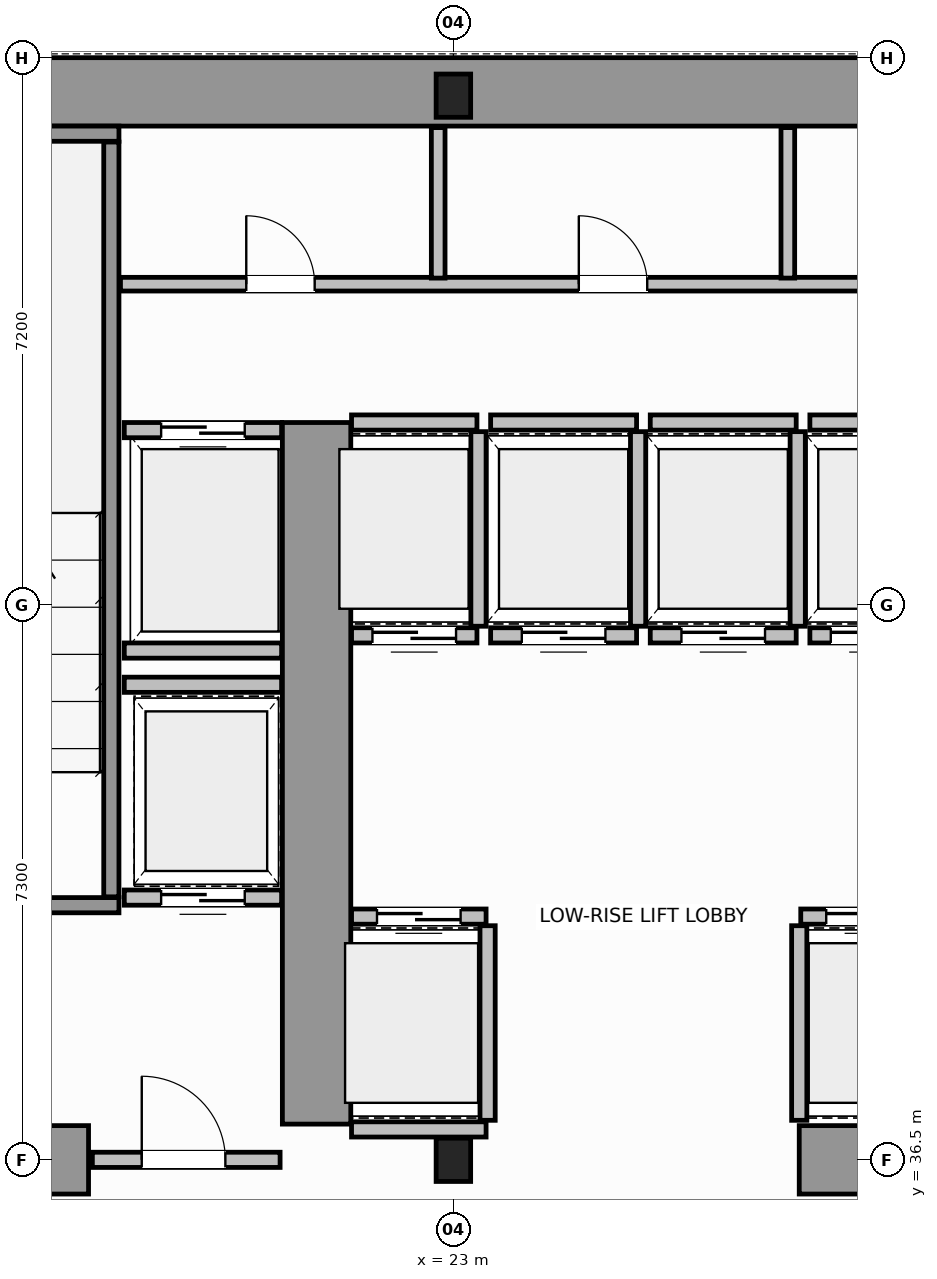
"""IFC4 building model, lengths in metres.
Left out: names, types, materials, properties, quantities, classifications, styles, units other than length and angle.
Written with IfcOpenShell. Run it as: python <this file> out.ifc"""

import sys

from ifc_helpers import new_model, si_unit, direction, frame, frame_2d, origin, origin_2d, place, context, subcontext, project, spatial, rectangle, i_section, extrude, source, transform, mapped, element, fill, save


model = new_model("IFC4")
c1 = context("Model", 3, precision=1e-05, world=origin(), true_north=direction((0.0, 1.0)))
c2 = subcontext(c1, "Body", "Model", "MODEL_VIEW")
j1 = project(units=[si_unit("LENGTHUNIT", "METRE"), si_unit("PLANEANGLEUNIT", "RADIAN")], contexts=[c1])
p1 = place(None, origin())
s1 = spatial("IfcSite", under=j1, at=p1, CompositionType="ELEMENT")
p2 = place(p1, origin())
s2 = spatial("IfcBuilding", under=s1, at=p2, CompositionType="ELEMENT")
p3 = place(p2, frame((0.0, 0.0, 18.8)))
s3 = spatial("IfcBuildingStorey", under=s2, at=p3, CompositionType="ELEMENT", Elevation=18.8)
m1 = source(origin(), c2, "Body", "SweptSolid", [
    extrude(i_section(OverallWidth=0.454, OverallDepth=0.569, WebThickness=0.078, FlangeThickness=0.08, FilletRadius=0.015, at=origin_2d()), origin(), (0.0, 0.0, 1.0), 3.8),
])
for number, where, z_axis, x_axis in (
    (1, (23.0, 36.5, 0.0), (0.0, 0.0, 1.0), (1.0, 0.0, 0.0)),
    (2, (23.0, 50.5, 0.0), (0.0, 0.0, 1.0), (1.0, 0.0, 0.0)),
):
    element("IfcColumn", number, at=place(p3, frame(where, z_axis=z_axis, x_axis=x_axis)), inside=s3, PredefinedType="COLUMN", context=c2, shape_type="MappedRepresentation", body=[
        mapped(m1, transform((0.0, 0.0, 0.0), scale=1.0)),
    ])
p4 = place(p3, frame((14.454, 50.55, 0.0), z_axis=(0.0, 0.0, 1.0), x_axis=(1.0, 0.0, 0.0)))
e3 = element("IfcWall", 3, at=p4, inside=s3, PredefinedType="SHEAR", context=c2, shape_type="SweptSolid", body=[
    extrude(rectangle(XDim=19.544, YDim=0.9, at=frame_2d((9.772, 0.0))), origin(), (0.0, 0.0, 1.0), 3.8),
])
p5 = place(p3, frame((14.47, 36.5, 0.0), z_axis=(0.0, 0.0, 1.0), x_axis=(1.0, 0.0, 0.0)))
e4 = element("IfcWall", 4, at=p5, inside=s3, PredefinedType="SHEAR", context=c2, shape_type="SweptSolid", body=[
    extrude(rectangle(XDim=3.73, YDim=0.9, at=frame_2d((1.865, 0.0))), origin(), (0.0, 0.0, 1.0), 2.38),
])
p6 = place(p3, frame((27.55, 36.5, 0.0), z_axis=(0.0, 0.0, 1.0), x_axis=(1.0, 0.0, 0.0)))
e5 = element("IfcWall", 5, at=p6, inside=s3, PredefinedType="SHEAR", context=c2, shape_type="SweptSolid", body=[
    extrude(rectangle(XDim=4.5, YDim=0.9, at=frame_2d((2.25, 0.0))), origin(), (0.0, 0.0, 1.0), 3.8),
])
p7 = place(p3, frame((21.2, 36.97, 0.0), z_axis=(0.0, 0.0, 1.0), x_axis=(0.0, 1.0, 0.0)))
e6 = element("IfcWall", 6, at=p7, inside=s3, PredefinedType="SHEAR", context=c2, shape_type="SweptSolid", body=[
    extrude(rectangle(XDim=9.23, YDim=0.9, at=frame_2d((4.615, 0.0))), origin(), (0.0, 0.0, 1.0), 3.8),
])
p8 = place(p3, frame((14.45, 39.85, 0.0), z_axis=(0.0, 0.0, 1.0), x_axis=(1.0, 0.0, 0.0)))
e7 = element("IfcWall", 7, at=p8, inside=s3, PredefinedType="SOLIDWALL", context=c2, shape_type="SweptSolid", body=[
    extrude(rectangle(XDim=4.15, YDim=0.2, at=frame_2d((2.075, 0.0))), origin(), (0.0, 0.0, 1.0), 3.8),
])
p9 = place(p8, frame((1.725, 0.0, 0.0)))
e8 = element("IfcOpeningElement", 8, at=p9, cuts=e7, PredefinedType="OPENING", context=c2, shape_type="SweptSolid", body=[
    extrude(rectangle(XDim=1.1, YDim=2.15, at=frame_2d((0.55, 1.075))), frame((0.0, 0.11, 0.0), z_axis=(0.0, -1.0, 0.0), x_axis=(1.0, 0.0, 0.0)), (0.0, 0.0, 1.0), 0.22),
])
p10 = place(p3, frame((14.45, 50.0, 0.0), z_axis=(0.0, 0.0, 1.0), x_axis=(1.0, 0.0, 0.0)))
e9 = element("IfcWall", 9, at=p10, inside=s3, PredefinedType="SOLIDWALL", context=c2, shape_type="SweptSolid", body=[
    extrude(rectangle(XDim=4.15, YDim=0.2, at=frame_2d((2.075, 0.0))), origin(), (0.0, 0.0, 1.0), 3.8),
])
p11 = place(p3, frame((18.5, 39.96, 0.0), z_axis=(0.0, 0.0, 1.0), x_axis=(0.0, 1.0, 0.0)))
e10 = element("IfcWall", 10, at=p11, inside=s3, PredefinedType="SOLIDWALL", context=c2, shape_type="SweptSolid", body=[
    extrude(rectangle(XDim=9.93, YDim=0.2, at=frame_2d((4.965, 0.0))), origin(), (0.0, 0.0, 1.0), 3.8),
])
p12 = place(p3, frame((18.25, 36.5, 0.0), z_axis=(0.0, 0.0, 1.0), x_axis=(1.0, 0.0, 0.0)))
e11 = element("IfcWall", 11, at=p12, inside=s3, PredefinedType="SOLIDWALL", context=c2, shape_type="SweptSolid", body=[
    extrude(rectangle(XDim=2.47, YDim=0.2, at=frame_2d((1.235, 0.0))), origin(), (0.0, 0.0, 1.0), 2.37),
])
p13 = place(p12, frame((0.65, 0.0, 0.0)))
e12 = element("IfcOpeningElement", 12, at=p13, cuts=e11, PredefinedType="OPENING", context=c2, shape_type="SweptSolid", body=[
    extrude(rectangle(XDim=1.1, YDim=2.15, at=frame_2d((0.55, 1.075))), frame((0.0, 0.11, 0.0), z_axis=(0.0, -1.0, 0.0), x_axis=(1.0, 0.0, 0.0)), (0.0, 0.0, 1.0), 0.22),
])
p14 = place(p3, frame((21.66, 39.7, 0.0), z_axis=(0.0, 0.0, 1.0), x_axis=(1.0, 0.0, 0.0)))
e13 = element("IfcWall", 13, at=p14, inside=s3, PredefinedType="SOLIDWALL", context=c2, shape_type="SweptSolid", body=[
    extrude(rectangle(XDim=1.77, YDim=0.2, at=frame_2d((0.885, 0.0))), origin(), (0.0, 0.0, 1.0), 3.58),
])
p15 = place(p14, frame((0.335, 0.0, 0.0)))
e14 = element("IfcOpeningElement", 14, at=p15, cuts=e13, PredefinedType="OPENING", context=c2, shape_type="SweptSolid", body=[
    extrude(rectangle(XDim=1.1, YDim=2.15, at=frame_2d((0.55, 1.075))), frame((0.0, 0.11, 0.0), z_axis=(0.0, -1.0, 0.0), x_axis=(1.0, 0.0, 0.0)), (0.0, 0.0, 1.0), 0.22),
])
p16 = place(p3, frame((21.66, 36.9, 0.0), z_axis=(0.0, 0.0, 1.0), x_axis=(1.0, 0.0, 0.0)))
e15 = element("IfcWall", 15, at=p16, inside=s3, PredefinedType="SOLIDWALL", context=c2, shape_type="SweptSolid", body=[
    extrude(rectangle(XDim=1.77, YDim=0.2, at=frame_2d((0.885, 0.0))), origin(), (0.0, 0.0, 1.0), 2.37),
])
p17 = place(p3, frame((23.45, 37.02, 0.0), z_axis=(0.0, 0.0, 1.0), x_axis=(0.0, 1.0, 0.0)))
e16 = element("IfcWall", 16, at=p17, inside=s3, PredefinedType="SOLIDWALL", context=c2, shape_type="SweptSolid", body=[
    extrude(rectangle(XDim=2.56, YDim=0.2, at=frame_2d((1.28, 0.0))), origin(), (0.0, 0.0, 1.0), 3.58),
])
p18 = place(p3, frame((27.57, 39.7, 0.0), z_axis=(0.0, 0.0, 1.0), x_axis=(1.0, 0.0, 0.0)))
e17 = element("IfcWall", 17, at=p18, inside=s3, PredefinedType="SOLIDWALL", context=c2, shape_type="SweptSolid", body=[
    extrude(rectangle(XDim=1.77, YDim=0.2, at=frame_2d((0.885, 0.0))), origin(), (0.0, 0.0, 1.0), 3.58),
])
p19 = place(p18, frame((0.335, 0.0, 0.0)))
e18 = element("IfcOpeningElement", 18, at=p19, cuts=e17, PredefinedType="OPENING", context=c2, shape_type="SweptSolid", body=[
    extrude(rectangle(XDim=1.1, YDim=2.15, at=frame_2d((0.55, 1.075))), frame((0.0, 0.11, 0.0), z_axis=(0.0, -1.0, 0.0), x_axis=(1.0, 0.0, 0.0)), (0.0, 0.0, 1.0), 0.22),
])
p20 = place(p3, frame((27.55, 37.02, 0.0), z_axis=(0.0, 0.0, 1.0), x_axis=(0.0, 1.0, 0.0)))
e19 = element("IfcWall", 19, at=p20, inside=s3, PredefinedType="SOLIDWALL", context=c2, shape_type="SweptSolid", body=[
    extrude(rectangle(XDim=2.56, YDim=0.2, at=frame_2d((1.28, 0.0))), origin(), (0.0, 0.0, 1.0), 3.58),
])
p21 = place(p3, frame((21.66, 43.4, 0.0), z_axis=(0.0, 0.0, 1.0), x_axis=(1.0, 0.0, 0.0)))
e20 = element("IfcWall", 20, at=p21, inside=s3, PredefinedType="SOLIDWALL", context=c2, shape_type="SweptSolid", body=[
    extrude(rectangle(XDim=1.65, YDim=0.2, at=frame_2d((0.825, 0.0))), origin(), (0.0, 0.0, 1.0), 3.58),
])
p22 = place(p21, frame((0.275, 0.0, 0.0)))
e21 = element("IfcOpeningElement", 21, at=p22, cuts=e20, PredefinedType="OPENING", context=c2, shape_type="SweptSolid", body=[
    extrude(rectangle(XDim=1.1, YDim=2.15, at=frame_2d((0.55, 1.075))), frame((0.0, 0.11, 0.0), z_axis=(0.0, -1.0, 0.0), x_axis=(1.0, 0.0, 0.0)), (0.0, 0.0, 1.0), 0.22),
])
p23 = place(p3, frame((21.66, 46.2, 0.0), z_axis=(0.0, 0.0, 1.0), x_axis=(1.0, 0.0, 0.0)))
e22 = element("IfcWall", 22, at=p23, inside=s3, PredefinedType="SOLIDWALL", context=c2, shape_type="SweptSolid", body=[
    extrude(rectangle(XDim=1.65, YDim=0.2, at=frame_2d((0.825, 0.0))), origin(), (0.0, 0.0, 1.0), 3.58),
])
p24 = place(p3, frame((23.33, 43.52, 0.0), z_axis=(0.0, 0.0, 1.0), x_axis=(0.0, 1.0, 0.0)))
e23 = element("IfcWall", 23, at=p24, inside=s3, PredefinedType="SOLIDWALL", context=c2, shape_type="SweptSolid", body=[
    extrude(rectangle(XDim=2.56, YDim=0.2, at=frame_2d((1.28, 0.0))), origin(), (0.0, 0.0, 1.0), 3.58),
])
p25 = place(p3, frame((23.49, 43.4, 0.0), z_axis=(0.0, 0.0, 1.0), x_axis=(1.0, 0.0, 0.0)))
e24 = element("IfcWall", 24, at=p25, inside=s3, PredefinedType="SOLIDWALL", context=c2, shape_type="SweptSolid", body=[
    extrude(rectangle(XDim=1.92, YDim=0.2, at=frame_2d((0.96, 0.0))), origin(), (0.0, 0.0, 1.0), 3.58),
])
p26 = place(p25, frame((0.41, 0.0, 0.0)))
e25 = element("IfcOpeningElement", 25, at=p26, cuts=e24, PredefinedType="OPENING", context=c2, shape_type="SweptSolid", body=[
    extrude(rectangle(XDim=1.1, YDim=2.15, at=frame_2d((0.55, 1.075))), frame((0.0, 0.11, 0.0), z_axis=(0.0, -1.0, 0.0), x_axis=(1.0, 0.0, 0.0)), (0.0, 0.0, 1.0), 0.22),
])
p27 = place(p3, frame((23.49, 46.2, 0.0), z_axis=(0.0, 0.0, 1.0), x_axis=(1.0, 0.0, 0.0)))
e26 = element("IfcWall", 26, at=p27, inside=s3, PredefinedType="SOLIDWALL", context=c2, shape_type="SweptSolid", body=[
    extrude(rectangle(XDim=1.92, YDim=0.2, at=frame_2d((0.96, 0.0))), origin(), (0.0, 0.0, 1.0), 3.58),
])
p28 = place(p3, frame((25.43, 43.52, 0.0), z_axis=(0.0, 0.0, 1.0), x_axis=(0.0, 1.0, 0.0)))
e27 = element("IfcWall", 27, at=p28, inside=s3, PredefinedType="SOLIDWALL", context=c2, shape_type="SweptSolid", body=[
    extrude(rectangle(XDim=2.56, YDim=0.2, at=frame_2d((1.28, 0.0))), origin(), (0.0, 0.0, 1.0), 3.58),
])
p29 = place(p3, frame((25.59, 43.4, 0.0), z_axis=(0.0, 0.0, 1.0), x_axis=(1.0, 0.0, 0.0)))
e28 = element("IfcWall", 28, at=p29, inside=s3, PredefinedType="SOLIDWALL", context=c2, shape_type="SweptSolid", body=[
    extrude(rectangle(XDim=1.92, YDim=0.2, at=frame_2d((0.96, 0.0))), origin(), (0.0, 0.0, 1.0), 3.58),
])
p30 = place(p29, frame((0.41, 0.0, 0.0)))
e29 = element("IfcOpeningElement", 29, at=p30, cuts=e28, PredefinedType="OPENING", context=c2, shape_type="SweptSolid", body=[
    extrude(rectangle(XDim=1.1, YDim=2.15, at=frame_2d((0.55, 1.075))), frame((0.0, 0.11, 0.0), z_axis=(0.0, -1.0, 0.0), x_axis=(1.0, 0.0, 0.0)), (0.0, 0.0, 1.0), 0.22),
])
p31 = place(p3, frame((25.59, 46.2, 0.0), z_axis=(0.0, 0.0, 1.0), x_axis=(1.0, 0.0, 0.0)))
e30 = element("IfcWall", 30, at=p31, inside=s3, PredefinedType="SOLIDWALL", context=c2, shape_type="SweptSolid", body=[
    extrude(rectangle(XDim=1.92, YDim=0.2, at=frame_2d((0.96, 0.0))), origin(), (0.0, 0.0, 1.0), 3.58),
])
p32 = place(p3, frame((27.53, 43.52, 0.0), z_axis=(0.0, 0.0, 1.0), x_axis=(0.0, 1.0, 0.0)))
e31 = element("IfcWall", 31, at=p32, inside=s3, PredefinedType="SOLIDWALL", context=c2, shape_type="SweptSolid", body=[
    extrude(rectangle(XDim=2.56, YDim=0.2, at=frame_2d((1.28, 0.0))), origin(), (0.0, 0.0, 1.0), 3.58),
])
p33 = place(p3, frame((27.69, 43.4, 0.0), z_axis=(0.0, 0.0, 1.0), x_axis=(1.0, 0.0, 0.0)))
e32 = element("IfcWall", 32, at=p33, inside=s3, PredefinedType="SOLIDWALL", context=c2, shape_type="SweptSolid", body=[
    extrude(rectangle(XDim=1.65, YDim=0.2, at=frame_2d((0.825, 0.0))), origin(), (0.0, 0.0, 1.0), 3.58),
])
p34 = place(p33, frame((0.275, 0.0, 0.0)))
e33 = element("IfcOpeningElement", 33, at=p34, cuts=e32, PredefinedType="OPENING", context=c2, shape_type="SweptSolid", body=[
    extrude(rectangle(XDim=1.1, YDim=2.15, at=frame_2d((0.55, 1.075))), frame((0.0, 0.11, 0.0), z_axis=(0.0, -1.0, 0.0), x_axis=(1.0, 0.0, 0.0)), (0.0, 0.0, 1.0), 0.22),
])
p35 = place(p3, frame((27.69, 46.2, 0.0), z_axis=(0.0, 0.0, 1.0), x_axis=(1.0, 0.0, 0.0)))
e34 = element("IfcWall", 34, at=p35, inside=s3, PredefinedType="SOLIDWALL", context=c2, shape_type="SweptSolid", body=[
    extrude(rectangle(XDim=1.65, YDim=0.2, at=frame_2d((0.825, 0.0))), origin(), (0.0, 0.0, 1.0), 3.58),
])
p36 = place(p3, frame((18.67, 46.1, 0.0), z_axis=(0.0, 0.0, 1.0), x_axis=(1.0, 0.0, 0.0)))
e35 = element("IfcWall", 35, at=p36, inside=s3, PredefinedType="SOLIDWALL", context=c2, shape_type="SweptSolid", body=[
    extrude(rectangle(XDim=2.07, YDim=0.2, at=frame_2d((1.035, 0.0))), origin(), (0.0, 0.0, 1.0), 3.58),
])
p37 = place(p36, frame((0.485, 0.0, 0.0)))
e36 = element("IfcOpeningElement", 36, at=p37, cuts=e35, PredefinedType="OPENING", context=c2, shape_type="SweptSolid", body=[
    extrude(rectangle(XDim=1.1, YDim=2.15, at=frame_2d((0.55, 1.075))), frame((0.0, 0.11, 0.0), z_axis=(0.0, -1.0, 0.0), x_axis=(1.0, 0.0, 0.0)), (0.0, 0.0, 1.0), 0.22),
])
p38 = place(p3, frame((18.67, 43.2, 0.0), z_axis=(0.0, 0.0, 1.0), x_axis=(1.0, 0.0, 0.0)))
e37 = element("IfcWall", 37, at=p38, inside=s3, PredefinedType="SOLIDWALL", context=c2, shape_type="SweptSolid", body=[
    extrude(rectangle(XDim=2.07, YDim=0.2, at=frame_2d((1.035, 0.0))), origin(), (0.0, 0.0, 1.0), 3.58),
])
p39 = place(p3, frame((18.67, 39.95, 0.0), z_axis=(0.0, 0.0, 1.0), x_axis=(1.0, 0.0, 0.0)))
e38 = element("IfcWall", 38, at=p39, inside=s3, PredefinedType="SOLIDWALL", context=c2, shape_type="SweptSolid", body=[
    extrude(rectangle(XDim=2.07, YDim=0.2, at=frame_2d((1.035, 0.0))), origin(), (0.0, 0.0, 1.0), 3.58),
])
p40 = place(p39, frame((0.485, 0.0, 0.0)))
e39 = element("IfcOpeningElement", 39, at=p40, cuts=e38, PredefinedType="OPENING", context=c2, shape_type="SweptSolid", body=[
    extrude(rectangle(XDim=1.1, YDim=2.15, at=frame_2d((0.55, 1.075))), frame((0.0, 0.11, 0.0), z_axis=(0.0, -1.0, 0.0), x_axis=(1.0, 0.0, 0.0)), (0.0, 0.0, 1.0), 0.22),
])
p41 = place(p3, frame((18.67, 42.75, 0.0), z_axis=(0.0, 0.0, 1.0), x_axis=(1.0, 0.0, 0.0)))
e40 = element("IfcWall", 40, at=p41, inside=s3, PredefinedType="SOLIDWALL", context=c2, shape_type="SweptSolid", body=[
    extrude(rectangle(XDim=2.07, YDim=0.2, at=frame_2d((1.035, 0.0))), origin(), (0.0, 0.0, 1.0), 3.58),
])
p42 = place(p3, frame((18.62, 48.02, 0.0), z_axis=(0.0, 0.0, 1.0), x_axis=(1.0, 0.0, 0.0)))
e41 = element("IfcWall", 41, at=p42, inside=s3, PredefinedType="PLUMBINGWALL", context=c2, shape_type="SweptSolid", body=[
    extrude(rectangle(XDim=30.76, YDim=0.18, at=frame_2d((15.38, 0.0))), origin(), (0.0, 0.0, 1.0), 3.58),
])
p43 = place(p42, frame((1.655, 0.0, 0.0)))
e42 = element("IfcOpeningElement", 42, at=p43, cuts=e41, PredefinedType="OPENING", context=c2, shape_type="SweptSolid", body=[
    extrude(rectangle(XDim=0.9, YDim=2.15, at=frame_2d((0.45, 1.075))), frame((0.0, 0.1, 0.0), z_axis=(0.0, -1.0, 0.0), x_axis=(1.0, 0.0, 0.0)), (0.0, 0.0, 1.0), 0.2),
])
p44 = place(p42, frame((6.03, 0.0, 0.0)))
e43 = element("IfcOpeningElement", 43, at=p44, cuts=e41, PredefinedType="OPENING", context=c2, shape_type="SweptSolid", body=[
    extrude(rectangle(XDim=0.9, YDim=2.15, at=frame_2d((0.45, 1.075))), frame((0.0, 0.1, 0.0), z_axis=(0.0, -1.0, 0.0), x_axis=(1.0, 0.0, 0.0)), (0.0, 0.0, 1.0), 0.2),
])
p45 = place(p42, frame((10.93, 0.0, 0.0)))
e44 = element("IfcOpeningElement", 44, at=p45, cuts=e41, PredefinedType="OPENING", context=c2, shape_type="SweptSolid", body=[
    extrude(rectangle(XDim=0.9, YDim=2.15, at=frame_2d((0.45, 1.075))), frame((0.0, 0.1, 0.0), z_axis=(0.0, -1.0, 0.0), x_axis=(1.0, 0.0, 0.0)), (0.0, 0.0, 1.0), 0.2),
])
p46 = place(p42, frame((16.13, 0.0, 0.0)))
e45 = element("IfcOpeningElement", 45, at=p46, cuts=e41, PredefinedType="OPENING", context=c2, shape_type="SweptSolid", body=[
    extrude(rectangle(XDim=0.9, YDim=2.15, at=frame_2d((0.45, 1.075))), frame((0.0, 0.1, 0.0), z_axis=(0.0, -1.0, 0.0), x_axis=(1.0, 0.0, 0.0)), (0.0, 0.0, 1.0), 0.2),
])
p47 = place(p42, frame((21.73, 0.0, 0.0)))
e46 = element("IfcOpeningElement", 46, at=p47, cuts=e41, PredefinedType="OPENING", context=c2, shape_type="SweptSolid", body=[
    extrude(rectangle(XDim=0.9, YDim=2.15, at=frame_2d((0.45, 1.075))), frame((0.0, 0.1, 0.0), z_axis=(0.0, -1.0, 0.0), x_axis=(1.0, 0.0, 0.0)), (0.0, 0.0, 1.0), 0.2),
])
p48 = place(p42, frame((27.505, 0.0, 0.0)))
e47 = element("IfcOpeningElement", 47, at=p48, cuts=e41, PredefinedType="OPENING", context=c2, shape_type="SweptSolid", body=[
    extrude(rectangle(XDim=0.9, YDim=2.15, at=frame_2d((0.45, 1.075))), frame((0.0, 0.1, 0.0), z_axis=(0.0, -1.0, 0.0), x_axis=(1.0, 0.0, 0.0)), (0.0, 0.0, 1.0), 0.2),
])
p49 = place(p3, frame((22.8, 48.1, 0.0), z_axis=(0.0, 0.0, 1.0), x_axis=(0.0, 1.0, 0.0)))
e48 = element("IfcWall", 48, at=p49, inside=s3, PredefinedType="PLUMBINGWALL", context=c2, shape_type="SweptSolid", body=[
    extrude(rectangle(XDim=1.98, YDim=0.18, at=frame_2d((0.99, 0.0))), origin(), (0.0, 0.0, 1.0), 2.77),
])
p50 = place(p3, frame((27.4, 48.1, 0.0), z_axis=(0.0, 0.0, 1.0), x_axis=(0.0, 1.0, 0.0)))
e49 = element("IfcWall", 49, at=p50, inside=s3, PredefinedType="PLUMBINGWALL", context=c2, shape_type="SweptSolid", body=[
    extrude(rectangle(XDim=1.98, YDim=0.18, at=frame_2d((0.99, 0.0))), origin(), (0.0, 0.0, 1.0), 3.58),
])
m2 = source(origin(), c2, "Body", "SweptSolid", [
    extrude(rectangle(XDim=1.1, YDim=2.15, at=frame_2d((0.55, 1.075))), frame((0.0, 0.025, 0.0), z_axis=(0.0, -1.0, 0.0), x_axis=(1.0, 0.0, 0.0)), (0.0, 0.0, 1.0), 0.05),
])
p51 = place(p13, origin())
e50 = element("IfcDoor", 50, at=p51, inside=s3, OperationType="SINGLE_SWING_RIGHT", PredefinedType="DOOR", context=c2, shape_type="MappedRepresentation", body=[
    mapped(m2, transform((0.0, 0.0, 0.0), scale=1.0)),
])
fill(e12, e50)
p52 = place(p15, origin())
e51 = element("IfcDoor", 51, at=p52, inside=s3, OperationType="DOUBLE_DOOR_SLIDING", PredefinedType="DOOR", context=c2, shape_type="MappedRepresentation", body=[
    mapped(m2, transform((0.0, 0.0, 0.0), scale=1.0)),
])
fill(e14, e51)
p53 = place(p19, origin())
e52 = element("IfcDoor", 52, at=p53, inside=s3, OperationType="DOUBLE_DOOR_SLIDING", PredefinedType="DOOR", context=c2, shape_type="MappedRepresentation", body=[
    mapped(m2, transform((0.0, 0.0, 0.0), scale=1.0)),
])
fill(e18, e52)
p54 = place(p22, origin())
e53 = element("IfcDoor", 53, at=p54, inside=s3, OperationType="DOUBLE_DOOR_SLIDING", PredefinedType="DOOR", context=c2, shape_type="MappedRepresentation", body=[
    mapped(m2, transform((0.0, 0.0, 0.0), scale=1.0)),
])
fill(e21, e53)
p55 = place(p26, origin())
e54 = element("IfcDoor", 54, at=p55, inside=s3, OperationType="DOUBLE_DOOR_SLIDING", PredefinedType="DOOR", context=c2, shape_type="MappedRepresentation", body=[
    mapped(m2, transform((0.0, 0.0, 0.0), scale=1.0)),
])
fill(e25, e54)
p56 = place(p30, origin())
e55 = element("IfcDoor", 55, at=p56, inside=s3, OperationType="DOUBLE_DOOR_SLIDING", PredefinedType="DOOR", context=c2, shape_type="MappedRepresentation", body=[
    mapped(m2, transform((0.0, 0.0, 0.0), scale=1.0)),
])
fill(e29, e55)
p57 = place(p34, origin())
e56 = element("IfcDoor", 56, at=p57, inside=s3, OperationType="DOUBLE_DOOR_SLIDING", PredefinedType="DOOR", context=c2, shape_type="MappedRepresentation", body=[
    mapped(m2, transform((0.0, 0.0, 0.0), scale=1.0)),
])
fill(e33, e56)
p58 = place(p37, origin())
e57 = element("IfcDoor", 57, at=p58, inside=s3, OperationType="DOUBLE_DOOR_SLIDING", PredefinedType="DOOR", context=c2, shape_type="MappedRepresentation", body=[
    mapped(m2, transform((0.0, 0.0, 0.0), scale=1.0)),
])
fill(e36, e57)
p59 = place(p40, origin())
e58 = element("IfcDoor", 58, at=p59, inside=s3, OperationType="DOUBLE_DOOR_SLIDING", PredefinedType="DOOR", context=c2, shape_type="MappedRepresentation", body=[
    mapped(m2, transform((0.0, 0.0, 0.0), scale=1.0)),
])
fill(e39, e58)
m3 = source(origin(), c2, "Body", "SweptSolid", [
    extrude(rectangle(XDim=0.9, YDim=2.15, at=frame_2d((0.45, 1.075))), frame((0.0, 0.025, 0.0), z_axis=(0.0, -1.0, 0.0), x_axis=(1.0, 0.0, 0.0)), (0.0, 0.0, 1.0), 0.05),
])
p60 = place(p43, origin())
e59 = element("IfcDoor", 59, at=p60, inside=s3, OperationType="SINGLE_SWING_LEFT", PredefinedType="DOOR", context=c2, shape_type="MappedRepresentation", body=[
    mapped(m3, transform((0.0, 0.0, 0.0), scale=1.0)),
])
fill(e42, e59)
p61 = place(p44, origin())
e60 = element("IfcDoor", 60, at=p61, inside=s3, OperationType="SINGLE_SWING_RIGHT", PredefinedType="DOOR", context=c2, shape_type="MappedRepresentation", body=[
    mapped(m3, transform((0.0, 0.0, 0.0), scale=1.0)),
])
fill(e43, e60)
save(model, sys.argv[1])
